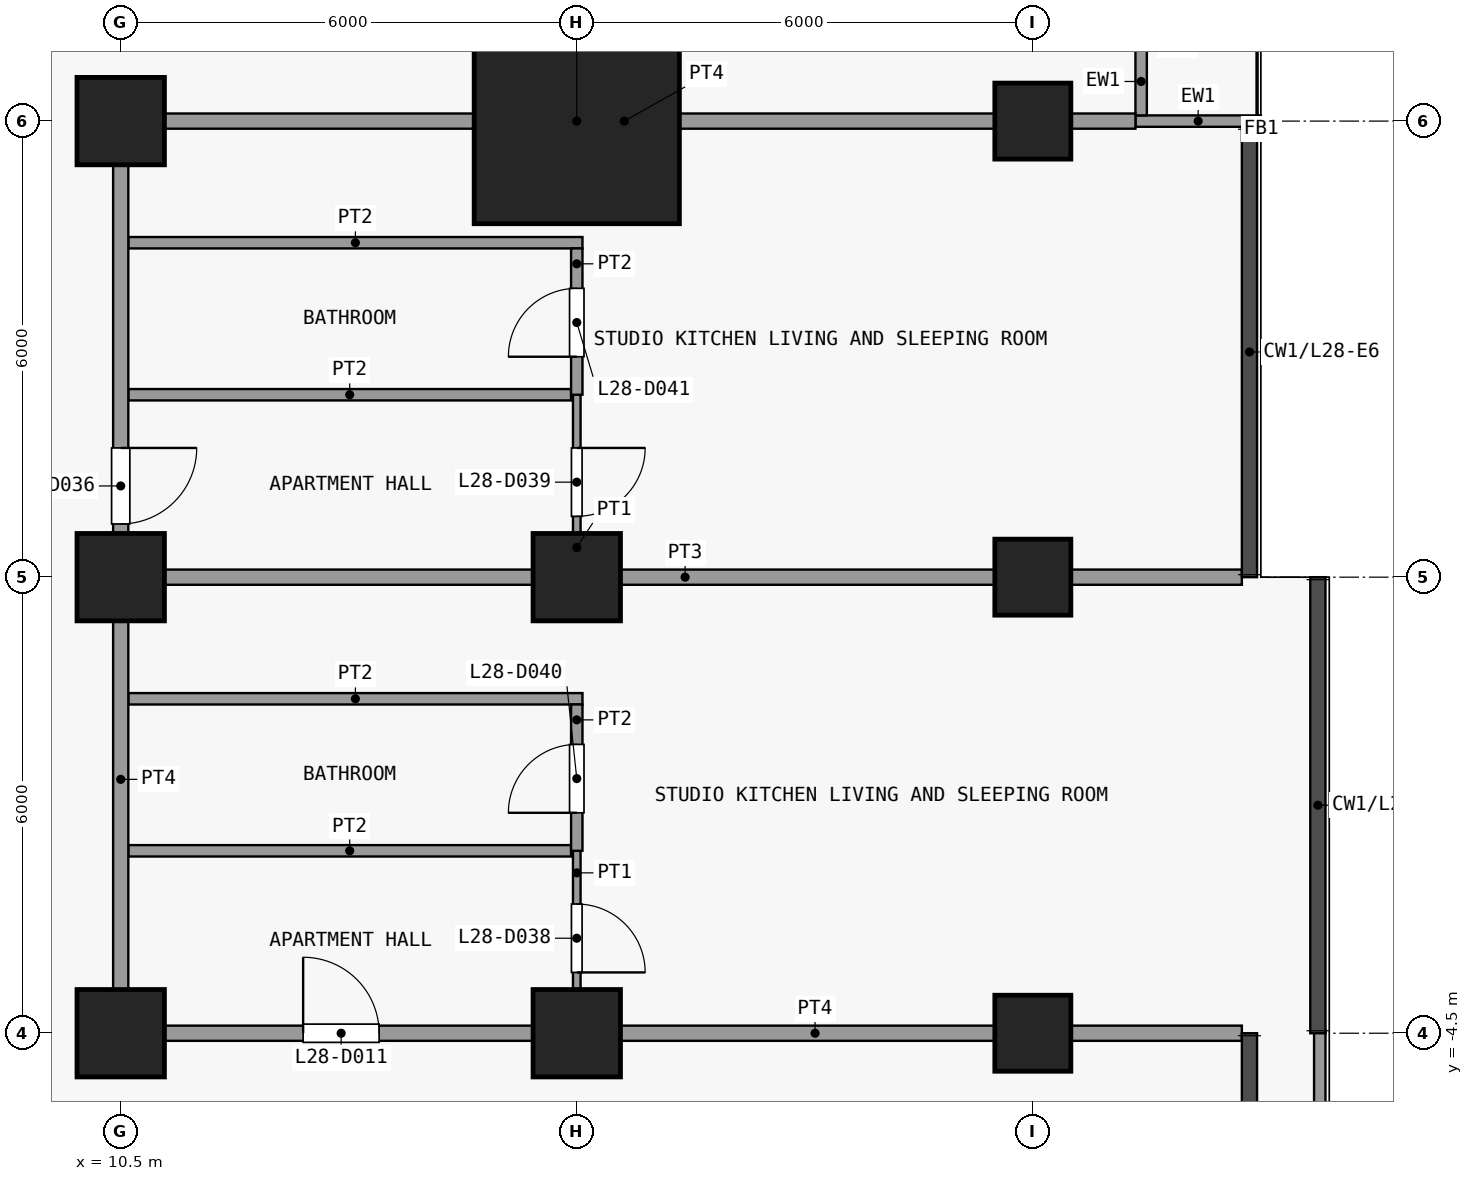
"""IFC4 building model, lengths in metres.
Left out: names, types, materials, properties, quantities, classifications, styles, units other than length and angle.
Written with IfcOpenShell. Run it as: python <this file> out.ifc"""

import sys

from ifc_helpers import new_model, si_unit, direction, frame, frame_2d, origin, origin_2d, place, context, subcontext, project, spatial, rectangle, extrude, element, fill, save


model = new_model("IFC4")
c1 = context("Model", 3, precision=1e-05, world=origin(), true_north=direction((0.0, 1.0)))
c2 = subcontext(c1, "Body", "Model", "MODEL_VIEW")
j1 = project(units=[si_unit("LENGTHUNIT", "METRE"), si_unit("PLANEANGLEUNIT", "RADIAN")], contexts=[c1])
p1 = place(None, origin())
s1 = spatial("IfcSite", under=j1, at=p1, CompositionType="ELEMENT")
p2 = place(p1, origin())
s2 = spatial("IfcBuilding", under=s1, at=p2, CompositionType="ELEMENT")
p3 = place(p2, frame((0.0, 0.0, 113.5)))
s3 = spatial("IfcBuildingStorey", under=s2, at=p3, CompositionType="ELEMENT", Elevation=113.5)
for number, where, z_axis, x_axis in (
    (1, (10.5, -4.5, 0.0), (0.0, 0.0, 1.0), (1.0, 0.0, 0.0)),
    (2, (10.5, 1.5, 0.0), (0.0, 0.0, 1.0), (1.0, 0.0, 0.0)),
    (3, (10.5, 7.5, 0.0), (0.0, 0.0, 1.0), (1.0, 0.0, 0.0)),
    (4, (16.5, -4.5, 0.0), (0.0, 0.0, 1.0), (1.0, 0.0, 0.0)),
    (5, (16.5, 1.5, 0.0), (0.0, 0.0, 1.0), (1.0, 0.0, 0.0)),
):
    element("IfcColumn", number, at=place(p3, frame(where, z_axis=z_axis, x_axis=x_axis)), inside=s3, PredefinedType="COLUMN", context=c2, shape_type="SweptSolid", body=[
        extrude(rectangle(XDim=1.15, YDim=1.15, at=origin_2d()), origin(), (0.0, 0.0, 1.0), 3.6),
    ])
p4 = place(p3, frame((16.5, 7.5, 0.0), z_axis=(0.0, 0.0, 1.0), x_axis=(1.0, 0.0, 0.0)))
e6 = element("IfcColumn", 6, at=p4, inside=s3, PredefinedType="COLUMN", context=c2, shape_type="SweptSolid", body=[
    extrude(rectangle(XDim=2.7, YDim=2.7, at=origin_2d()), origin(), (0.0, 0.0, 1.0), 3.6),
])
for number, where, z_axis, x_axis in (
    (7, (22.5, -4.5, 0.0), (0.0, 0.0, 1.0), (1.0, 0.0, 0.0)),
    (8, (22.5, 1.5, 0.0), (0.0, 0.0, 1.0), (1.0, 0.0, 0.0)),
    (9, (22.5, 7.5, 0.0), (0.0, 0.0, 1.0), (1.0, 0.0, 0.0)),
):
    element("IfcColumn", number, at=place(p3, frame(where, z_axis=z_axis, x_axis=x_axis)), inside=s3, PredefinedType="COLUMN", context=c2, shape_type="SweptSolid", body=[
        extrude(rectangle(XDim=1.0, YDim=1.0, at=origin_2d()), origin(), (0.0, 0.0, 1.0), 3.6),
    ])
p5 = place(p3, frame((23.85, 7.5, 0.0), z_axis=(0.0, 0.0, 1.0), x_axis=(1.0, 0.0, 0.0)))
e10 = element("IfcWall", 10, at=p5, inside=s3, PredefinedType="SOLIDWALL", context=c2, shape_type="SweptSolid", body=[
    extrude(rectangle(XDim=1.65, YDim=0.15, at=frame_2d((0.825, 0.0))), origin(), (0.0, 0.0, 1.0), 3.3),
])
p6 = place(p3, frame((23.925, 13.425, 0.0), z_axis=(0.0, 0.0, 1.0), x_axis=(0.0, -1.0, 0.0)))
e11 = element("IfcWall", 11, at=p6, inside=s3, PredefinedType="SOLIDWALL", context=c2, shape_type="SweptSolid", body=[
    extrude(rectangle(XDim=5.85, YDim=0.15, at=frame_2d((2.925, 0.0))), origin(), (0.0, 0.0, 1.0), 3.3),
])
p7 = place(p6, frame((0.825, 0.0, 0.0)))
e12 = element("IfcOpeningElement", 12, at=p7, cuts=e11, PredefinedType="OPENING", context=c2, shape_type="SweptSolid", body=[
    extrude(rectangle(XDim=1.2, YDim=2.4, at=frame_2d((0.6, 1.2))), frame((0.0, 0.085, 0.0), z_axis=(0.0, -1.0, 0.0), x_axis=(1.0, 0.0, 0.0)), (0.0, 0.0, 1.0), 0.17),
])
p8 = place(p6, frame((3.038, 0.0, 0.9)))
e13 = element("IfcOpeningElement", 13, at=p8, cuts=e11, PredefinedType="OPENING", context=c2, shape_type="SweptSolid", body=[
    extrude(rectangle(XDim=1.8, YDim=2.1, at=frame_2d((0.9, 1.05))), frame((0.0, 0.085, 0.0), z_axis=(0.0, -1.0, 0.0), x_axis=(1.0, 0.0, 0.0)), (0.0, 0.0, 1.0), 0.17),
])
p9 = place(p3, frame((26.275, -4.46, 0.0), z_axis=(0.0, 0.0, 1.0), x_axis=(0.0, -1.0, 0.0)))
e14 = element("IfcWall", 14, at=p9, inside=s3, PredefinedType="PARAPET", context=c2, shape_type="SweptSolid", body=[
    extrude(rectangle(XDim=8.99, YDim=0.15, at=frame_2d((4.495, 0.0))), origin(), (0.0, 0.0, 1.0), 1.15),
])
p10 = place(p3, frame((10.4, -4.5, 0.0), z_axis=(0.0, 0.0, 1.0), x_axis=(1.0, 0.0, 0.0)))
e15 = element("IfcWall", 15, at=p10, inside=s3, PredefinedType="PARTITIONING", context=c2, shape_type="SweptSolid", body=[
    extrude(rectangle(XDim=14.85, YDim=0.2, at=frame_2d((7.425, 0.0))), origin(), (0.0, 0.0, 1.0), 3.3),
])
p11 = place(p10, frame((2.5, 0.0, 0.0)))
e16 = element("IfcOpeningElement", 16, at=p11, cuts=e15, PredefinedType="OPENING", context=c2, shape_type="SweptSolid", body=[
    extrude(rectangle(XDim=1.0, YDim=2.1, at=frame_2d((0.5, 1.05))), frame((0.0, 0.11, 0.0), z_axis=(0.0, -1.0, 0.0), x_axis=(1.0, 0.0, 0.0)), (0.0, 0.0, 1.0), 0.22),
])
p12 = place(p3, frame((10.6, -2.1, 0.0), z_axis=(0.0, 0.0, 1.0), x_axis=(1.0, 0.0, 0.0)))
e17 = element("IfcWall", 17, at=p12, inside=s3, PredefinedType="PARTITIONING", context=c2, shape_type="SweptSolid", body=[
    extrude(rectangle(XDim=5.825, YDim=0.15, at=frame_2d((2.913, 0.0))), origin(), (0.0, 0.0, 1.0), 3.3),
])
p13 = place(p3, frame((10.6, -0.1, 0.0), z_axis=(0.0, 0.0, 1.0), x_axis=(1.0, 0.0, 0.0)))
e18 = element("IfcWall", 18, at=p13, inside=s3, PredefinedType="PARTITIONING", context=c2, shape_type="SweptSolid", body=[
    extrude(rectangle(XDim=5.975, YDim=0.15, at=frame_2d((2.987, 0.0))), origin(), (0.0, 0.0, 1.0), 3.3),
])
p14 = place(p3, frame((10.6, 1.5, 0.0), z_axis=(0.0, 0.0, 1.0), x_axis=(1.0, 0.0, 0.0)))
e19 = element("IfcWall", 19, at=p14, inside=s3, PredefinedType="PARTITIONING", context=c2, shape_type="SweptSolid", body=[
    extrude(rectangle(XDim=14.65, YDim=0.2, at=frame_2d((7.325, 0.0))), origin(), (0.0, 0.0, 1.0), 3.3),
])
p15 = place(p3, frame((10.6, 3.9, 0.0), z_axis=(0.0, 0.0, 1.0), x_axis=(1.0, 0.0, 0.0)))
e20 = element("IfcWall", 20, at=p15, inside=s3, PredefinedType="PARTITIONING", context=c2, shape_type="SweptSolid", body=[
    extrude(rectangle(XDim=5.825, YDim=0.15, at=frame_2d((2.913, 0.0))), origin(), (0.0, 0.0, 1.0), 3.3),
])
p16 = place(p3, frame((10.6, 5.9, 0.0), z_axis=(0.0, 0.0, 1.0), x_axis=(1.0, 0.0, 0.0)))
e21 = element("IfcWall", 21, at=p16, inside=s3, PredefinedType="PARTITIONING", context=c2, shape_type="SweptSolid", body=[
    extrude(rectangle(XDim=5.975, YDim=0.15, at=frame_2d((2.987, 0.0))), origin(), (0.0, 0.0, 1.0), 3.3),
])
p17 = place(p3, frame((10.4, 7.5, 0.0), z_axis=(0.0, 0.0, 1.0), x_axis=(1.0, 0.0, 0.0)))
e22 = element("IfcWall", 22, at=p17, inside=s3, PredefinedType="PARTITIONING", context=c2, shape_type="SweptSolid", body=[
    extrude(rectangle(XDim=13.45, YDim=0.2, at=frame_2d((6.725, 0.0))), origin(), (0.0, 0.0, 1.0), 3.3),
])
p18 = place(p3, frame((10.5, -4.4, 0.0), z_axis=(0.0, 0.0, 1.0), x_axis=(0.0, 1.0, 0.0)))
e23 = element("IfcWall", 23, at=p18, inside=s3, PredefinedType="PARTITIONING", context=c2, shape_type="SweptSolid", body=[
    extrude(rectangle(XDim=11.8, YDim=0.2, at=frame_2d((5.9, 0.0))), origin(), (0.0, 0.0, 1.0), 3.3),
])
p19 = place(p18, frame((6.6, 0.0, 0.0)))
e24 = element("IfcOpeningElement", 24, at=p19, cuts=e23, PredefinedType="OPENING", context=c2, shape_type="SweptSolid", body=[
    extrude(rectangle(XDim=1.0, YDim=2.1, at=frame_2d((0.5, 1.05))), frame((0.0, 0.11, 0.0), z_axis=(0.0, -1.0, 0.0), x_axis=(1.0, 0.0, 0.0)), (0.0, 0.0, 1.0), 0.22),
])
p20 = place(p3, frame((16.5, -4.4, 0.0), z_axis=(0.0, 0.0, 1.0), x_axis=(0.0, 1.0, 0.0)))
e25 = element("IfcWall", 25, at=p20, inside=s3, PredefinedType="PARTITIONING", context=c2, shape_type="SweptSolid", body=[
    extrude(rectangle(XDim=2.3, YDim=0.1, at=frame_2d((1.15, 0.0))), origin(), (0.0, 0.0, 1.0), 3.3),
])
p21 = place(p20, frame((0.7, 0.0, 0.0)))
e26 = element("IfcOpeningElement", 26, at=p21, cuts=e25, PredefinedType="OPENING", context=c2, shape_type="SweptSolid", body=[
    extrude(rectangle(XDim=0.9, YDim=2.1, at=frame_2d((0.45, 1.05))), frame((0.0, 0.06, 0.0), z_axis=(0.0, -1.0, 0.0), x_axis=(1.0, 0.0, 0.0)), (0.0, 0.0, 1.0), 0.12),
])
p22 = place(p3, frame((16.5, 1.6, 0.0), z_axis=(0.0, 0.0, 1.0), x_axis=(0.0, 1.0, 0.0)))
e27 = element("IfcWall", 27, at=p22, inside=s3, PredefinedType="PARTITIONING", context=c2, shape_type="SweptSolid", body=[
    extrude(rectangle(XDim=2.3, YDim=0.1, at=frame_2d((1.15, 0.0))), origin(), (0.0, 0.0, 1.0), 3.3),
])
p23 = place(p22, frame((0.7, 0.0, 0.0)))
e28 = element("IfcOpeningElement", 28, at=p23, cuts=e27, PredefinedType="OPENING", context=c2, shape_type="SweptSolid", body=[
    extrude(rectangle(XDim=0.9, YDim=2.1, at=frame_2d((0.45, 1.05))), frame((0.0, 0.06, 0.0), z_axis=(0.0, -1.0, 0.0), x_axis=(1.0, 0.0, 0.0)), (0.0, 0.0, 1.0), 0.12),
])
p24 = place(p3, frame((16.5, -2.1, 0.0), z_axis=(0.0, 0.0, 1.0), x_axis=(0.0, 1.0, 0.0)))
e29 = element("IfcWall", 29, at=p24, inside=s3, PredefinedType="PARTITIONING", context=c2, shape_type="SweptSolid", body=[
    extrude(rectangle(XDim=1.925, YDim=0.15, at=frame_2d((0.962, 0.0))), origin(), (0.0, 0.0, 1.0), 3.3),
])
p25 = place(p24, frame((0.5, 0.0, 0.0)))
e30 = element("IfcOpeningElement", 30, at=p25, cuts=e29, PredefinedType="OPENING", context=c2, shape_type="SweptSolid", body=[
    extrude(rectangle(XDim=0.9, YDim=2.1, at=frame_2d((0.45, 1.05))), frame((0.0, 0.085, 0.0), z_axis=(0.0, -1.0, 0.0), x_axis=(1.0, 0.0, 0.0)), (0.0, 0.0, 1.0), 0.17),
])
p26 = place(p3, frame((16.5, 3.9, 0.0), z_axis=(0.0, 0.0, 1.0), x_axis=(0.0, 1.0, 0.0)))
e31 = element("IfcWall", 31, at=p26, inside=s3, PredefinedType="PARTITIONING", context=c2, shape_type="SweptSolid", body=[
    extrude(rectangle(XDim=1.925, YDim=0.15, at=frame_2d((0.962, 0.0))), origin(), (0.0, 0.0, 1.0), 3.3),
])
p27 = place(p26, frame((0.5, 0.0, 0.0)))
e32 = element("IfcOpeningElement", 32, at=p27, cuts=e31, PredefinedType="OPENING", context=c2, shape_type="SweptSolid", body=[
    extrude(rectangle(XDim=0.9, YDim=2.1, at=frame_2d((0.45, 1.05))), frame((0.0, 0.085, 0.0), z_axis=(0.0, -1.0, 0.0), x_axis=(1.0, 0.0, 0.0)), (0.0, 0.0, 1.0), 0.17),
])
p28 = place(p11, origin())
e33 = element("IfcDoor", 33, at=p28, inside=s3, OperationType="SINGLE_SWING_RIGHT", PredefinedType="DOOR", context=c2, shape_type="SweptSolid", body=[
    extrude(rectangle(XDim=1.0, YDim=2.1, at=frame_2d((0.5, 1.05))), frame((0.0, 0.025, 0.0), z_axis=(0.0, -1.0, 0.0), x_axis=(1.0, 0.0, 0.0)), (0.0, 0.0, 1.0), 0.05),
])
fill(e16, e33)
p29 = place(p19, origin())
e34 = element("IfcDoor", 34, at=p29, inside=s3, OperationType="SINGLE_SWING_RIGHT", PredefinedType="DOOR", context=c2, shape_type="SweptSolid", body=[
    extrude(rectangle(XDim=1.0, YDim=2.1, at=frame_2d((0.5, 1.05))), frame((0.0, 0.025, 0.0), z_axis=(0.0, -1.0, 0.0), x_axis=(1.0, 0.0, 0.0)), (0.0, 0.0, 1.0), 0.05),
])
fill(e24, e34)
p30 = place(p21, origin())
e35 = element("IfcDoor", 35, at=p30, inside=s3, OperationType="SINGLE_SWING_LEFT", PredefinedType="DOOR", context=c2, shape_type="SweptSolid", body=[
    extrude(rectangle(XDim=0.9, YDim=2.1, at=frame_2d((0.45, 1.05))), frame((0.0, 0.025, 0.0), z_axis=(0.0, -1.0, 0.0), x_axis=(1.0, 0.0, 0.0)), (0.0, 0.0, 1.0), 0.05),
])
fill(e26, e35)
p31 = place(p23, origin())
e36 = element("IfcDoor", 36, at=p31, inside=s3, OperationType="SINGLE_SWING_RIGHT", PredefinedType="DOOR", context=c2, shape_type="SweptSolid", body=[
    extrude(rectangle(XDim=0.9, YDim=2.1, at=frame_2d((0.45, 1.05))), frame((0.0, 0.025, 0.0), z_axis=(0.0, -1.0, 0.0), x_axis=(1.0, 0.0, 0.0)), (0.0, 0.0, 1.0), 0.05),
])
fill(e28, e36)
p32 = place(p25, origin())
e37 = element("IfcDoor", 37, at=p32, inside=s3, OperationType="SINGLE_SWING_RIGHT", PredefinedType="DOOR", context=c2, shape_type="SweptSolid", body=[
    extrude(rectangle(XDim=0.9, YDim=2.1, at=frame_2d((0.45, 1.05))), frame((0.0, 0.025, 0.0), z_axis=(0.0, -1.0, 0.0), x_axis=(1.0, 0.0, 0.0)), (0.0, 0.0, 1.0), 0.05),
])
fill(e30, e37)
p33 = place(p27, origin())
e38 = element("IfcDoor", 38, at=p33, inside=s3, OperationType="SINGLE_SWING_RIGHT", PredefinedType="DOOR", context=c2, shape_type="SweptSolid", body=[
    extrude(rectangle(XDim=0.9, YDim=2.1, at=frame_2d((0.45, 1.05))), frame((0.0, 0.025, 0.0), z_axis=(0.0, -1.0, 0.0), x_axis=(1.0, 0.0, 0.0)), (0.0, 0.0, 1.0), 0.05),
])
fill(e32, e38)
save(model, sys.argv[1])
